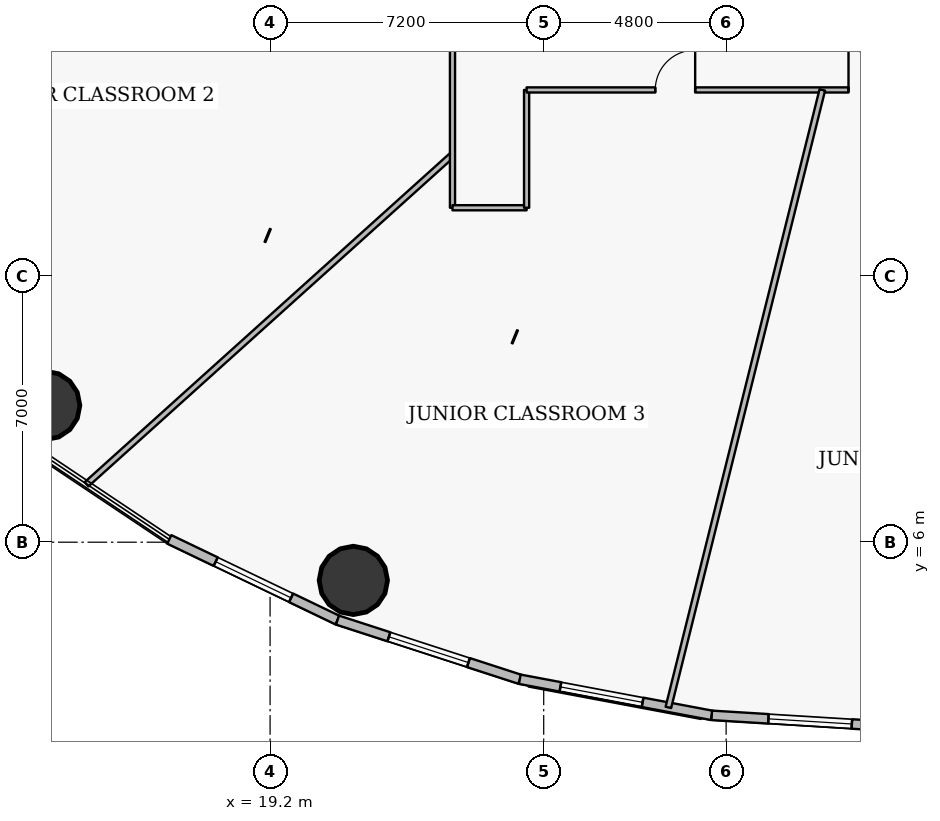
"""IFC4 building model, lengths in metres.
Left out: names, types, materials, properties, quantities, classifications, styles, units other than length and angle.
Written with IfcOpenShell. Run it as: python <this file> out.ifc"""

import sys

from ifc_helpers import new_model, si_unit, direction, frame, frame_2d, origin, origin_2d, place, context, subcontext, project, spatial, rectangle, hollow_circle, extrude, source, transform, mapped, element, fill, save


model = new_model("IFC4")
c1 = context("Model", 3, precision=1e-05, world=origin(), true_north=direction((0.0, 1.0)))
c2 = subcontext(c1, "Body", "Model", "MODEL_VIEW")
j1 = project(units=[si_unit("LENGTHUNIT", "METRE"), si_unit("PLANEANGLEUNIT", "RADIAN")], contexts=[c1])
p1 = place(None, origin())
s1 = spatial("IfcSite", under=j1, at=p1, CompositionType="ELEMENT")
p2 = place(p1, origin())
s2 = spatial("IfcBuilding", under=s1, at=p2, CompositionType="ELEMENT")
p3 = place(p2, frame((0.0, 0.0, 10.2)))
s3 = spatial("IfcBuildingStorey", under=s2, at=p3, CompositionType="ELEMENT", Elevation=10.2)
for number, where, z_axis, x_axis in (
    (1, (13.295, 9.599, 0.0), (0.0, 0.0, 1.0), (1.0, 0.0, 0.0)),
    (2, (21.391, 4.995, 0.0), (0.0, 0.0, 1.0), (1.0, 0.0, 0.0)),
):
    element("IfcColumn", number, at=place(p3, frame(where, z_axis=z_axis, x_axis=x_axis)), inside=s3, PredefinedType="COLUMN", context=c2, shape_type="SweptSolid", body=[
        extrude(hollow_circle(Radius=0.9, WallThickness=0.05, at=origin_2d()), origin(), (0.0, 0.0, 1.0), 4.2),
    ])
p4 = place(p3, frame((20.974, 3.95, 0.0), z_axis=(0.0, 0.0, 1.0), x_axis=(-0.901559523397, 0.432655088692, 0.0)))
e3 = element("IfcWall", 3, at=p4, inside=s3, PredefinedType="SOLIDWALL", context=c2, shape_type="SweptSolid", body=[
    extrude(rectangle(XDim=4.91, YDim=0.25, at=frame_2d((2.455, 0.0))), origin(), (0.0, 0.0, 1.0), 3.9),
])
p5 = place(p4, frame((1.355, 0.0, 0.9)))
e4 = element("IfcOpeningElement", 4, at=p5, cuts=e3, PredefinedType="OPENING", context=c2, shape_type="SweptSolid", body=[
    extrude(rectangle(XDim=2.2, YDim=2.0, at=origin_2d()), frame((1.1, 0.135, 1.0), z_axis=(0.0, -1.0, 0.0), x_axis=(1.0, 0.0, 0.0)), (0.0, 0.0, 1.0), 0.27),
])
p6 = place(p3, frame((25.771, 2.394, 0.0), z_axis=(0.0, 0.0, 1.0), x_axis=(-0.951198629726, 0.308579271513, 0.0)))
e5 = element("IfcWall", 5, at=p6, inside=s3, PredefinedType="SOLIDWALL", context=c2, shape_type="SweptSolid", body=[
    extrude(rectangle(XDim=5.044, YDim=0.25, at=frame_2d((2.522, 0.0))), origin(), (0.0, 0.0, 1.0), 3.9),
])
p7 = place(p6, frame((1.422, 0.0, 0.9)))
e6 = element("IfcOpeningElement", 6, at=p7, cuts=e5, PredefinedType="OPENING", context=c2, shape_type="SweptSolid", body=[
    extrude(rectangle(XDim=2.2, YDim=2.0, at=origin_2d()), frame((1.1, 0.135, 1.0), z_axis=(0.0, -1.0, 0.0), x_axis=(1.0, 0.0, 0.0)), (0.0, 0.0, 1.0), 0.27),
])
p8 = place(p3, frame((30.822, 1.444, 0.0), z_axis=(0.0, 0.0, 1.0), x_axis=(-0.98278278947, 0.184764684726, 0.0)))
e7 = element("IfcWall", 7, at=p8, inside=s3, PredefinedType="SOLIDWALL", context=c2, shape_type="SweptSolid", body=[
    extrude(rectangle(XDim=5.139, YDim=0.25, at=frame_2d((2.569, 0.0))), origin(), (0.0, 0.0, 1.0), 3.9),
])
p9 = place(p8, frame((1.852, 0.0, 0.9)))
e8 = element("IfcOpeningElement", 8, at=p9, cuts=e7, PredefinedType="OPENING", context=c2, shape_type="SweptSolid", body=[
    extrude(rectangle(XDim=2.2, YDim=2.0, at=origin_2d()), frame((1.1, 0.135, 1.0), z_axis=(0.0, -1.0, 0.0), x_axis=(1.0, 0.0, 0.0)), (0.0, 0.0, 1.0), 0.27),
])
p10 = place(p3, frame((36.0, 1.125, 0.0), z_axis=(0.0, 0.0, 1.0), x_axis=(-0.998106762298, 0.061505211614, 0.0)))
e9 = element("IfcWall", 9, at=p10, inside=s3, PredefinedType="SOLIDWALL", context=c2, shape_type="SweptSolid", body=[
    extrude(rectangle(XDim=5.188, YDim=0.25, at=frame_2d((2.594, 0.0))), origin(), (0.0, 0.0, 1.0), 3.9),
])
p11 = place(p10, frame((1.494, 0.0, 0.9)))
e10 = element("IfcOpeningElement", 10, at=p11, cuts=e9, PredefinedType="OPENING", context=c2, shape_type="SweptSolid", body=[
    extrude(rectangle(XDim=2.2, YDim=2.0, at=origin_2d()), frame((1.1, 0.135, 1.0), z_axis=(0.0, -1.0, 0.0), x_axis=(1.0, 0.0, 0.0)), (0.0, 0.0, 1.0), 0.27),
])
p12 = place(p3, frame((14.37, 7.524, 0.0), z_axis=(0.0, 0.0, 1.0), x_axis=(0.743149857609, 0.669125017569, 0.0)))
e11 = element("IfcWall", 11, at=p12, inside=s3, PredefinedType="PARTITIONING", context=c2, shape_type="SweptSolid", body=[
    extrude(rectangle(XDim=12.958, YDim=0.15, at=frame_2d((6.479, 0.0))), origin(), (0.0, 0.0, 1.0), 3.285),
])
p13 = place(p3, frame((24.0, 14.8, 0.0), z_axis=(0.0, 0.0, 1.0), x_axis=(0.0, 1.0, 0.0)))
e12 = element("IfcWall", 12, at=p13, inside=s3, PredefinedType="PARTITIONING", context=c2, shape_type="SweptSolid", body=[
    extrude(rectangle(XDim=12.78, YDim=0.135, at=frame_2d((6.39, 0.0))), origin(), (0.0, 0.0, 1.0), 3.085),
])
p14 = place(p13, frame((5.748, 0.0, 0.0)))
e13 = element("IfcOpeningElement", 13, at=p14, cuts=e12, PredefinedType="OPENING", context=c2, shape_type="SweptSolid", body=[
    extrude(rectangle(XDim=1.05, YDim=2.15, at=origin_2d()), frame((0.525, 0.078, 1.075), z_axis=(0.0, -1.0, 0.0), x_axis=(1.0, 0.0, 0.0)), (0.0, 0.0, 1.0), 0.155),
])
p15 = place(p3, frame((24.0, 14.8, 0.0), z_axis=(0.0, 0.0, 1.0), x_axis=(1.0, 0.0, 0.0)))
e14 = element("IfcWall", 14, at=p15, inside=s3, PredefinedType="PARTITIONING", context=c2, shape_type="SweptSolid", body=[
    extrude(rectangle(XDim=1.95, YDim=0.135, at=frame_2d((0.975, 0.0))), origin(), (0.0, 0.0, 1.0), 3.9),
])
p16 = place(p3, frame((25.95, 14.8, 0.0), z_axis=(0.0, 0.0, 1.0), x_axis=(0.0, 1.0, 0.0)))
e15 = element("IfcWall", 15, at=p16, inside=s3, PredefinedType="PARTITIONING", context=c2, shape_type="SweptSolid", body=[
    extrude(rectangle(XDim=3.1, YDim=0.135, at=frame_2d((1.55, 0.0))), origin(), (0.0, 0.0, 1.0), 3.9),
])
p17 = place(p3, frame((25.95, 17.9, 0.0), z_axis=(0.0, 0.0, 1.0), x_axis=(1.0, 0.0, 0.0)))
e16 = element("IfcWall", 16, at=p17, inside=s3, PredefinedType="PARTITIONING", context=c2, shape_type="SweptSolid", body=[
    extrude(rectangle(XDim=10.25, YDim=0.135, at=frame_2d((5.125, 0.0))), origin(), (0.0, 0.0, 1.0), 3.085),
])
p18 = place(p17, frame((3.385, 0.0, 0.0)))
e17 = element("IfcOpeningElement", 17, at=p18, cuts=e16, PredefinedType="OPENING", context=c2, shape_type="SweptSolid", body=[
    extrude(rectangle(XDim=1.05, YDim=2.15, at=origin_2d()), frame((0.525, 0.078, 1.075), z_axis=(0.0, -1.0, 0.0), x_axis=(1.0, 0.0, 0.0)), (0.0, 0.0, 1.0), 0.155),
])
p19 = place(p17, frame((8.471, 0.0, 0.0)))
e18 = element("IfcOpeningElement", 18, at=p19, cuts=e16, PredefinedType="OPENING", context=c2, shape_type="SweptSolid", body=[
    extrude(rectangle(XDim=1.05, YDim=2.15, at=origin_2d()), frame((0.525, 0.078, 1.075), z_axis=(0.0, -1.0, 0.0), x_axis=(1.0, 0.0, 0.0)), (0.0, 0.0, 1.0), 0.155),
])
p20 = place(p3, frame((29.68, 1.654, 0.0), z_axis=(0.0, 0.0, 1.0), x_axis=(0.241928320832, 0.970294124263, 0.0)))
e19 = element("IfcWall", 19, at=p20, inside=s3, PredefinedType="PARTITIONING", context=c2, shape_type="SweptSolid", body=[
    extrude(rectangle(XDim=16.744, YDim=0.15, at=frame_2d((8.372, 0.0))), origin(), (0.0, 0.0, 1.0), 3.285),
])
m1 = source(origin(), c2, "Body", "SweptSolid", [
    extrude(rectangle(XDim=2.2, YDim=2.0, at=origin_2d()), frame((1.1, 0.03, 1.0), z_axis=(0.0, -1.0, 0.0), x_axis=(1.0, 0.0, 0.0)), (0.0, 0.0, 1.0), 0.06),
])
p21 = place(p5, origin())
e20 = element("IfcWindow", 20, at=p21, inside=s3, PartitioningType="TRIPLE_PANEL_VERTICAL", PredefinedType="WINDOW", context=c2, shape_type="MappedRepresentation", body=[
    mapped(m1, transform((0.0, 0.0, 0.0), x_axis=(1.0, 0.0, 0.0), y_axis=(0.0, 1.0, 0.0), z_axis=(0.0, 0.0, 1.0), scale=1.0)),
])
fill(e4, e20)
p22 = place(p7, origin())
e21 = element("IfcWindow", 21, at=p22, inside=s3, PartitioningType="TRIPLE_PANEL_VERTICAL", PredefinedType="WINDOW", context=c2, shape_type="MappedRepresentation", body=[
    mapped(m1, transform((0.0, 0.0, 0.0), x_axis=(1.0, 0.0, 0.0), y_axis=(0.0, 1.0, 0.0), z_axis=(0.0, 0.0, 1.0), scale=1.0)),
])
fill(e6, e21)
p23 = place(p9, origin())
e22 = element("IfcWindow", 22, at=p23, inside=s3, PartitioningType="TRIPLE_PANEL_VERTICAL", PredefinedType="WINDOW", context=c2, shape_type="MappedRepresentation", body=[
    mapped(m1, transform((0.0, 0.0, 0.0), x_axis=(1.0, 0.0, 0.0), y_axis=(0.0, 1.0, 0.0), z_axis=(0.0, 0.0, 1.0), scale=1.0)),
])
fill(e8, e22)
p24 = place(p11, origin())
e23 = element("IfcWindow", 23, at=p24, inside=s3, PartitioningType="TRIPLE_PANEL_VERTICAL", PredefinedType="WINDOW", context=c2, shape_type="MappedRepresentation", body=[
    mapped(m1, transform((0.0, 0.0, 0.0), x_axis=(1.0, 0.0, 0.0), y_axis=(0.0, 1.0, 0.0), z_axis=(0.0, 0.0, 1.0), scale=1.0)),
])
fill(e10, e23)
m2 = source(origin(), c2, "Body", "SweptSolid", [
    extrude(rectangle(XDim=1.05, YDim=2.15, at=origin_2d()), frame((0.525, 0.025, 1.075), z_axis=(0.0, -1.0, 0.0), x_axis=(1.0, 0.0, 0.0)), (0.0, 0.0, 1.0), 0.05),
])
p25 = place(p18, origin())
e24 = element("IfcDoor", 24, at=p25, inside=s3, OperationType="SINGLE_SWING_RIGHT", PredefinedType="DOOR", context=c2, shape_type="MappedRepresentation", body=[
    mapped(m2, transform((0.0, 0.0, 0.0), x_axis=(1.0, 0.0, 0.0), y_axis=(0.0, 1.0, 0.0), z_axis=(0.0, 0.0, 1.0), scale=1.0)),
])
fill(e17, e24)
p26 = place(p19, origin())
e25 = element("IfcDoor", 25, at=p26, inside=s3, OperationType="SINGLE_SWING_LEFT", PredefinedType="DOOR", context=c2, shape_type="MappedRepresentation", body=[
    mapped(m2, transform((0.0, 0.0, 0.0), x_axis=(1.0, 0.0, 0.0), y_axis=(0.0, 1.0, 0.0), z_axis=(0.0, 0.0, 1.0), scale=1.0)),
])
fill(e18, e25)
save(model, sys.argv[1])
